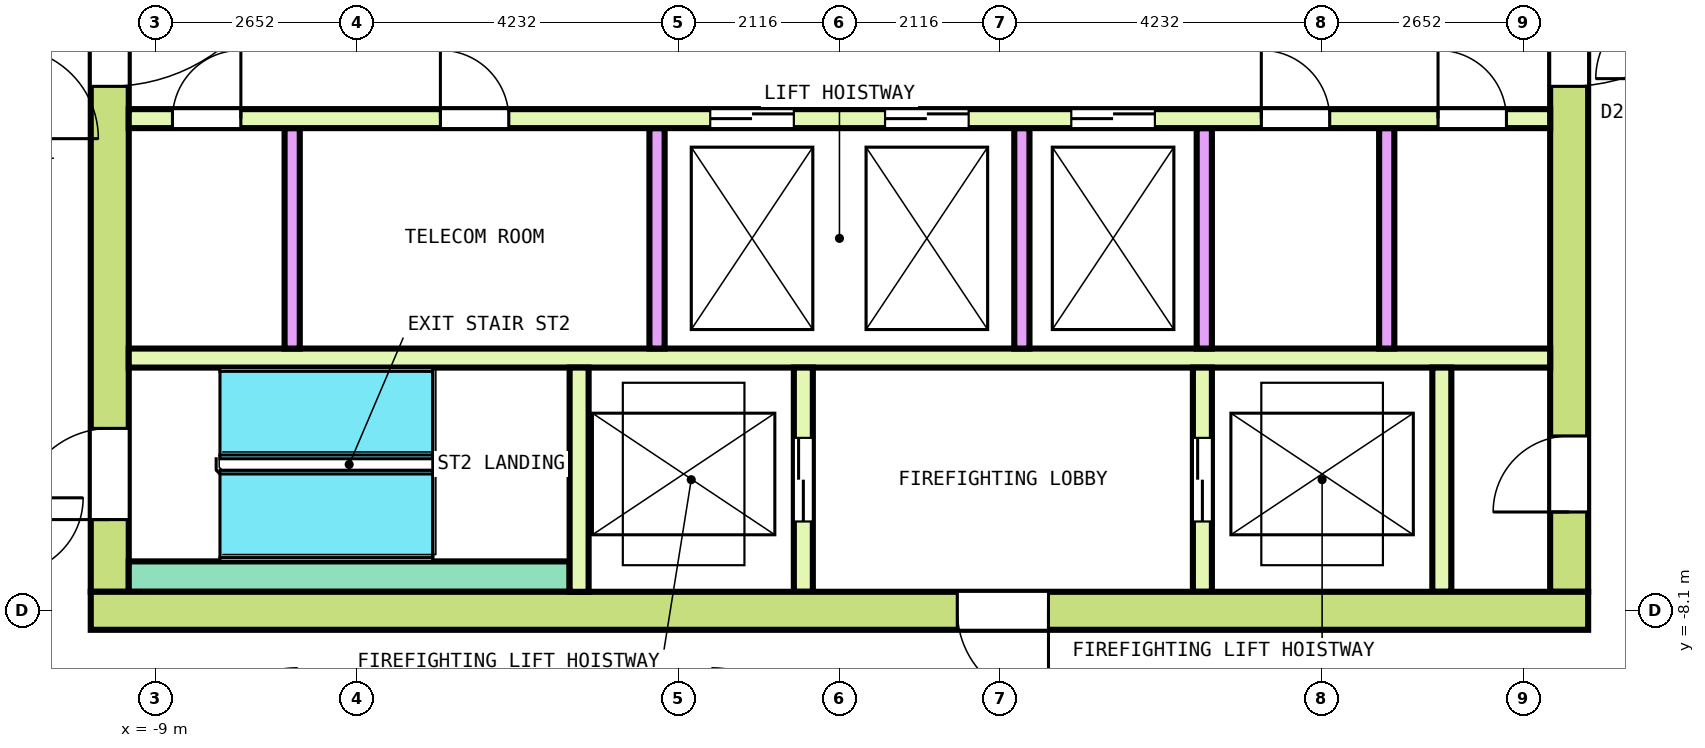
"""IFC4 building model, lengths in metres.
Left out: names, types, materials, properties, quantities, classifications, styles, units other than length and angle.
Written with IfcOpenShell. Run it as: python <this file> out.ifc"""

import sys

from ifc_helpers import new_model, si_unit, direction, frame, frame_2d, origin, place, context, subcontext, project, spatial, rectangle, extrude, element, fill, save


model = new_model("IFC4")
c1 = context("Model", 3, precision=1e-05, world=origin(), true_north=direction((0.0, 1.0)))
c2 = subcontext(c1, "Body", "Model", "MODEL_VIEW")
j1 = project(units=[si_unit("LENGTHUNIT", "METRE"), si_unit("PLANEANGLEUNIT", "RADIAN")], contexts=[c1])
p1 = place(None, origin())
s1 = spatial("IfcSite", under=j1, at=p1, CompositionType="ELEMENT")
p2 = place(p1, origin())
s2 = spatial("IfcBuilding", under=s1, at=p2, CompositionType="ELEMENT")
p3 = place(p2, frame((0.0, 0.0, 283.0)))
s3 = spatial("IfcBuildingStorey", under=s2, at=p3, CompositionType="ELEMENT", Elevation=283.0)
p4 = place(p3, frame((-9.85, -8.1, 0.0), z_axis=(0.0, 0.0, 1.0), x_axis=(1.0, 0.0, 0.0)))
e1 = element("IfcWall", 1, at=p4, inside=s3, PredefinedType="SHEAR", context=c2, shape_type="SweptSolid", body=[
    extrude(rectangle(XDim=19.7, YDim=0.5, at=frame_2d((9.85, 0.0))), origin(), (0.0, 0.0, 1.0), 3.7),
])
p5 = place(p4, frame((11.4, 0.0, 0.0)))
e2 = element("IfcOpeningElement", 2, at=p5, cuts=e1, PredefinedType="OPENING", context=c2, shape_type="SweptSolid", body=[
    extrude(rectangle(XDim=1.2, YDim=2.1, at=frame_2d((0.6, 1.05))), frame((0.0, 0.26, 0.0), z_axis=(0.0, -1.0, 0.0), x_axis=(1.0, 0.0, 0.0)), (0.0, 0.0, 1.0), 0.52),
])
p6 = place(p3, frame((-9.6, -7.85, 0.0), z_axis=(0.0, 0.0, 1.0), x_axis=(0.0, 1.0, 0.0)))
e3 = element("IfcWall", 3, at=p6, inside=s3, PredefinedType="SHEAR", context=c2, shape_type="SweptSolid", body=[
    extrude(rectangle(XDim=15.7, YDim=0.5, at=frame_2d((7.85, 0.0))), origin(), (0.0, 0.0, 1.0), 3.7),
])
p7 = place(p6, frame((6.65, 0.0, 0.0)))
e4 = element("IfcOpeningElement", 4, at=p7, cuts=e3, PredefinedType="OPENING", context=c2, shape_type="SweptSolid", body=[
    extrude(rectangle(XDim=2.4, YDim=2.1, at=frame_2d((1.2, 1.05))), frame((0.0, 0.26, 0.0), z_axis=(0.0, -1.0, 0.0), x_axis=(1.0, 0.0, 0.0)), (0.0, 0.0, 1.0), 0.52),
])
p8 = place(p6, frame((13.55, 0.0, 0.0)))
e5 = element("IfcOpeningElement", 5, at=p8, cuts=e3, PredefinedType="OPENING", context=c2, shape_type="SweptSolid", body=[
    extrude(rectangle(XDim=1.2, YDim=2.1, at=frame_2d((0.6, 1.05))), frame((0.0, 0.26, 0.0), z_axis=(0.0, -1.0, 0.0), x_axis=(1.0, 0.0, 0.0)), (0.0, 0.0, 1.0), 0.52),
])
p9 = place(p6, frame((0.95, 0.0, 0.0)))
e6 = element("IfcOpeningElement", 6, at=p9, cuts=e3, PredefinedType="OPENING", context=c2, shape_type="SweptSolid", body=[
    extrude(rectangle(XDim=1.2, YDim=2.1, at=frame_2d((0.6, 1.05))), frame((0.0, 0.26, 0.0), z_axis=(0.0, -1.0, 0.0), x_axis=(1.0, 0.0, 0.0)), (0.0, 0.0, 1.0), 0.52),
])
p10 = place(p3, frame((9.6, -7.85, 0.0), z_axis=(0.0, 0.0, 1.0), x_axis=(0.0, 1.0, 0.0)))
e7 = element("IfcWall", 7, at=p10, inside=s3, PredefinedType="SHEAR", context=c2, shape_type="SweptSolid", body=[
    extrude(rectangle(XDim=15.7, YDim=0.5, at=frame_2d((7.85, 0.0))), origin(), (0.0, 0.0, 1.0), 3.7),
])
p11 = place(p10, frame((6.65, 0.0, 0.0)))
e8 = element("IfcOpeningElement", 8, at=p11, cuts=e7, PredefinedType="OPENING", context=c2, shape_type="SweptSolid", body=[
    extrude(rectangle(XDim=2.4, YDim=2.1, at=frame_2d((1.2, 1.05))), frame((0.0, 0.26, 0.0), z_axis=(0.0, -1.0, 0.0), x_axis=(1.0, 0.0, 0.0)), (0.0, 0.0, 1.0), 0.52),
])
p12 = place(p10, frame((13.55, 0.0, 0.0)))
e9 = element("IfcOpeningElement", 9, at=p12, cuts=e7, PredefinedType="OPENING", context=c2, shape_type="SweptSolid", body=[
    extrude(rectangle(XDim=1.2, YDim=2.1, at=frame_2d((0.6, 1.05))), frame((0.0, 0.26, 0.0), z_axis=(0.0, -1.0, 0.0), x_axis=(1.0, 0.0, 0.0)), (0.0, 0.0, 1.0), 0.52),
])
p13 = place(p10, frame((1.05, 0.0, 0.0)))
e10 = element("IfcOpeningElement", 10, at=p13, cuts=e7, PredefinedType="OPENING", context=c2, shape_type="SweptSolid", body=[
    extrude(rectangle(XDim=1.0, YDim=2.1, at=frame_2d((0.5, 1.05))), frame((0.0, 0.26, 0.0), z_axis=(0.0, -1.0, 0.0), x_axis=(1.0, 0.0, 0.0)), (0.0, 0.0, 1.0), 0.52),
])
p14 = place(p3, frame((-9.35, -1.625, 0.0), z_axis=(0.0, 0.0, 1.0), x_axis=(1.0, 0.0, 0.0)))
e11 = element("IfcWall", 11, at=p14, inside=s3, PredefinedType="SOLIDWALL", context=c2, shape_type="SweptSolid", body=[
    extrude(rectangle(XDim=18.7, YDim=0.25, at=frame_2d((9.35, 0.0))), origin(), (0.0, 0.0, 1.0), 3.7),
])
p15 = place(p14, frame((7.65, 0.0, 0.0)))
e12 = element("IfcOpeningElement", 12, at=p15, cuts=e11, PredefinedType="OPENING", context=c2, shape_type="SweptSolid", body=[
    extrude(rectangle(XDim=1.1, YDim=2.1, at=frame_2d((0.55, 1.05))), frame((0.0, 0.135, 0.0), z_axis=(0.0, -1.0, 0.0), x_axis=(1.0, 0.0, 0.0)), (0.0, 0.0, 1.0), 0.27),
])
p16 = place(p14, frame((9.95, 0.0, 0.0)))
e13 = element("IfcOpeningElement", 13, at=p16, cuts=e11, PredefinedType="OPENING", context=c2, shape_type="SweptSolid", body=[
    extrude(rectangle(XDim=1.1, YDim=2.1, at=frame_2d((0.55, 1.05))), frame((0.0, 0.135, 0.0), z_axis=(0.0, -1.0, 0.0), x_axis=(1.0, 0.0, 0.0)), (0.0, 0.0, 1.0), 0.27),
])
p17 = place(p14, frame((12.4, 0.0, 0.0)))
e14 = element("IfcOpeningElement", 14, at=p17, cuts=e11, PredefinedType="OPENING", context=c2, shape_type="SweptSolid", body=[
    extrude(rectangle(XDim=1.1, YDim=2.1, at=frame_2d((0.55, 1.05))), frame((0.0, 0.135, 0.0), z_axis=(0.0, -1.0, 0.0), x_axis=(1.0, 0.0, 0.0)), (0.0, 0.0, 1.0), 0.27),
])
p18 = place(p14, frame((0.575, 0.0, 0.0)))
e15 = element("IfcOpeningElement", 15, at=p18, cuts=e11, PredefinedType="OPENING", context=c2, shape_type="SweptSolid", body=[
    extrude(rectangle(XDim=0.9, YDim=2.1, at=frame_2d((0.45, 1.05))), frame((0.0, 0.135, 0.0), z_axis=(0.0, -1.0, 0.0), x_axis=(1.0, 0.0, 0.0)), (0.0, 0.0, 1.0), 0.27),
])
p19 = place(p14, frame((4.1, 0.0, 0.0)))
e16 = element("IfcOpeningElement", 16, at=p19, cuts=e11, PredefinedType="OPENING", context=c2, shape_type="SweptSolid", body=[
    extrude(rectangle(XDim=0.9, YDim=2.1, at=frame_2d((0.45, 1.05))), frame((0.0, 0.135, 0.0), z_axis=(0.0, -1.0, 0.0), x_axis=(1.0, 0.0, 0.0)), (0.0, 0.0, 1.0), 0.27),
])
p20 = place(p14, frame((14.9, 0.0, 0.0)))
e17 = element("IfcOpeningElement", 17, at=p20, cuts=e11, PredefinedType="OPENING", context=c2, shape_type="SweptSolid", body=[
    extrude(rectangle(XDim=0.9, YDim=2.1, at=frame_2d((0.45, 1.05))), frame((0.0, 0.135, 0.0), z_axis=(0.0, -1.0, 0.0), x_axis=(1.0, 0.0, 0.0)), (0.0, 0.0, 1.0), 0.27),
])
p21 = place(p14, frame((17.225, 0.0, 0.0)))
e18 = element("IfcOpeningElement", 18, at=p21, cuts=e11, PredefinedType="OPENING", context=c2, shape_type="SweptSolid", body=[
    extrude(rectangle(XDim=0.9, YDim=2.1, at=frame_2d((0.45, 1.05))), frame((0.0, 0.135, 0.0), z_axis=(0.0, -1.0, 0.0), x_axis=(1.0, 0.0, 0.0)), (0.0, 0.0, 1.0), 0.27),
])
p22 = place(p3, frame((-9.35, -4.775, 0.0), z_axis=(0.0, 0.0, 1.0), x_axis=(1.0, 0.0, 0.0)))
e19 = element("IfcWall", 19, at=p22, inside=s3, PredefinedType="SOLIDWALL", context=c2, shape_type="SweptSolid", body=[
    extrude(rectangle(XDim=18.7, YDim=0.25, at=frame_2d((9.35, 0.0))), origin(), (0.0, 0.0, 1.0), 3.7),
])
for number, where, z_axis, x_axis in (
    (20, (-7.2, -4.65, 0.0), (0.0, 0.0, 1.0), (0.0, 1.0, 0.0)),
    (21, (-2.4, -4.65, 0.0), (0.0, 0.0, 1.0), (0.0, 1.0, 0.0)),
    (22, (2.4, -4.65, 0.0), (0.0, 0.0, 1.0), (0.0, 1.0, 0.0)),
    (23, (4.8, -4.65, 0.0), (0.0, 0.0, 1.0), (0.0, 1.0, 0.0)),
    (24, (7.2, -4.65, 0.0), (0.0, 0.0, 1.0), (0.0, 1.0, 0.0)),
):
    element("IfcWall", number, at=place(p3, frame(where, z_axis=z_axis, x_axis=x_axis)), inside=s3, PredefinedType="SOLIDWALL", context=c2, shape_type="SweptSolid", body=[
        extrude(rectangle(XDim=2.9, YDim=0.2, at=frame_2d((1.45, 0.0))), origin(), (0.0, 0.0, 1.0), 3.7),
    ])
p23 = place(p3, frame((-9.35, -7.65, 0.0), z_axis=(0.0, 0.0, 1.0), x_axis=(1.0, 0.0, 0.0)))
e25 = element("IfcWall", 25, at=p23, inside=s3, PredefinedType="SOLIDWALL", context=c2, shape_type="SweptSolid", body=[
    extrude(rectangle(XDim=5.8, YDim=0.4, at=frame_2d((2.9, 0.0))), origin(), (0.0, 0.0, 1.0), 3.7),
])
p24 = place(p3, frame((-3.425, -7.85, 0.0), z_axis=(0.0, 0.0, 1.0), x_axis=(0.0, 1.0, 0.0)))
e26 = element("IfcWall", 26, at=p24, inside=s3, PredefinedType="SOLIDWALL", context=c2, shape_type="SweptSolid", body=[
    extrude(rectangle(XDim=2.95, YDim=0.25, at=frame_2d((1.475, 0.0))), origin(), (0.0, 0.0, 1.0), 3.7),
])
p25 = place(p3, frame((-0.475, -7.85, 0.0), z_axis=(0.0, 0.0, 1.0), x_axis=(0.0, 1.0, 0.0)))
e27 = element("IfcWall", 27, at=p25, inside=s3, PredefinedType="SOLIDWALL", context=c2, shape_type="SweptSolid", body=[
    extrude(rectangle(XDim=2.95, YDim=0.25, at=frame_2d((1.475, 0.0))), origin(), (0.0, 0.0, 1.0), 3.7),
])
p26 = place(p25, frame((0.925, 0.0, 0.0)))
e28 = element("IfcOpeningElement", 28, at=p26, cuts=e27, PredefinedType="OPENING", context=c2, shape_type="SweptSolid", body=[
    extrude(rectangle(XDim=1.1, YDim=2.1, at=frame_2d((0.55, 1.05))), frame((0.0, 0.135, 0.0), z_axis=(0.0, -1.0, 0.0), x_axis=(1.0, 0.0, 0.0)), (0.0, 0.0, 1.0), 0.27),
])
p27 = place(p3, frame((4.775, -7.85, 0.0), z_axis=(0.0, 0.0, 1.0), x_axis=(0.0, 1.0, 0.0)))
e29 = element("IfcWall", 29, at=p27, inside=s3, PredefinedType="SOLIDWALL", context=c2, shape_type="SweptSolid", body=[
    extrude(rectangle(XDim=2.95, YDim=0.25, at=frame_2d((1.475, 0.0))), origin(), (0.0, 0.0, 1.0), 3.7),
])
p28 = place(p27, frame((0.925, 0.0, 0.0)))
e30 = element("IfcOpeningElement", 30, at=p28, cuts=e29, PredefinedType="OPENING", context=c2, shape_type="SweptSolid", body=[
    extrude(rectangle(XDim=1.1, YDim=2.1, at=frame_2d((0.55, 1.05))), frame((0.0, 0.135, 0.0), z_axis=(0.0, -1.0, 0.0), x_axis=(1.0, 0.0, 0.0)), (0.0, 0.0, 1.0), 0.27),
])
p29 = place(p3, frame((7.925, -7.85, 0.0), z_axis=(0.0, 0.0, 1.0), x_axis=(0.0, 1.0, 0.0)))
e31 = element("IfcWall", 31, at=p29, inside=s3, PredefinedType="SOLIDWALL", context=c2, shape_type="SweptSolid", body=[
    extrude(rectangle(XDim=2.95, YDim=0.25, at=frame_2d((1.475, 0.0))), origin(), (0.0, 0.0, 1.0), 3.7),
])
p30 = place(p15, origin())
e32 = element("IfcDoor", 32, at=p30, inside=s3, OperationType="DOUBLE_DOOR_SLIDING", PredefinedType="DOOR", context=c2, shape_type="SweptSolid", body=[
    extrude(rectangle(XDim=1.1, YDim=2.1, at=frame_2d((0.55, 1.05))), frame((0.0, 0.075, 0.0), z_axis=(0.0, -1.0, 0.0), x_axis=(1.0, 0.0, 0.0)), (0.0, 0.0, 1.0), 0.15),
])
fill(e12, e32)
p31 = place(p16, origin())
e33 = element("IfcDoor", 33, at=p31, inside=s3, OperationType="DOUBLE_DOOR_SLIDING", PredefinedType="DOOR", context=c2, shape_type="SweptSolid", body=[
    extrude(rectangle(XDim=1.1, YDim=2.1, at=frame_2d((0.55, 1.05))), frame((0.0, 0.075, 0.0), z_axis=(0.0, -1.0, 0.0), x_axis=(1.0, 0.0, 0.0)), (0.0, 0.0, 1.0), 0.15),
])
fill(e13, e33)
p32 = place(p17, origin())
e34 = element("IfcDoor", 34, at=p32, inside=s3, OperationType="DOUBLE_DOOR_SLIDING", PredefinedType="DOOR", context=c2, shape_type="SweptSolid", body=[
    extrude(rectangle(XDim=1.1, YDim=2.1, at=frame_2d((0.55, 1.05))), frame((0.0, 0.075, 0.0), z_axis=(0.0, -1.0, 0.0), x_axis=(1.0, 0.0, 0.0)), (0.0, 0.0, 1.0), 0.15),
])
fill(e14, e34)
p33 = place(p26, origin())
e35 = element("IfcDoor", 35, at=p33, inside=s3, OperationType="DOUBLE_DOOR_SLIDING", PredefinedType="DOOR", context=c2, shape_type="SweptSolid", body=[
    extrude(rectangle(XDim=1.1, YDim=2.1, at=frame_2d((0.55, 1.05))), frame((0.0, 0.075, 0.0), z_axis=(0.0, -1.0, 0.0), x_axis=(1.0, 0.0, 0.0)), (0.0, 0.0, 1.0), 0.15),
])
fill(e28, e35)
p34 = place(p28, origin())
e36 = element("IfcDoor", 36, at=p34, inside=s3, OperationType="DOUBLE_DOOR_SLIDING", PredefinedType="DOOR", context=c2, shape_type="SweptSolid", body=[
    extrude(rectangle(XDim=1.1, YDim=2.1, at=frame_2d((0.55, 1.05))), frame((0.0, 0.075, 0.0), z_axis=(0.0, -1.0, 0.0), x_axis=(1.0, 0.0, 0.0)), (0.0, 0.0, 1.0), 0.15),
])
fill(e30, e36)
p35 = place(p7, origin())
e37 = element("IfcDoor", 37, at=p35, inside=s3, OperationType="DOUBLE_DOOR_SINGLE_SWING", PredefinedType="DOOR", context=c2, shape_type="SweptSolid", body=[
    extrude(rectangle(XDim=2.4, YDim=2.1, at=frame_2d((1.2, 1.05))), frame((0.0, 0.2, 0.0), z_axis=(0.0, -1.0, 0.0), x_axis=(1.0, 0.0, 0.0)), (0.0, 0.0, 1.0), 0.4),
])
fill(e4, e37)
p36 = place(p11, origin())
e38 = element("IfcDoor", 38, at=p36, inside=s3, OperationType="DOUBLE_DOOR_SINGLE_SWING", PredefinedType="DOOR", context=c2, shape_type="SweptSolid", body=[
    extrude(rectangle(XDim=2.4, YDim=2.1, at=frame_2d((1.2, 1.05))), frame((0.0, 0.2, 0.0), z_axis=(0.0, -1.0, 0.0), x_axis=(1.0, 0.0, 0.0)), (0.0, 0.0, 1.0), 0.4),
])
fill(e8, e38)
p37 = place(p9, origin())
e39 = element("IfcDoor", 39, at=p37, inside=s3, OperationType="SINGLE_SWING_LEFT", PredefinedType="DOOR", context=c2, shape_type="SweptSolid", body=[
    extrude(rectangle(XDim=1.2, YDim=2.1, at=frame_2d((0.6, 1.05))), frame((0.0, 0.2, 0.0), z_axis=(0.0, -1.0, 0.0), x_axis=(1.0, 0.0, 0.0)), (0.0, 0.0, 1.0), 0.4),
])
fill(e6, e39)
p38 = place(p5, origin())
e40 = element("IfcDoor", 40, at=p38, inside=s3, OperationType="SINGLE_SWING_LEFT", PredefinedType="DOOR", context=c2, shape_type="SweptSolid", body=[
    extrude(rectangle(XDim=1.2, YDim=2.1, at=frame_2d((0.6, 1.05))), frame((0.0, 0.2, 0.0), z_axis=(0.0, -1.0, 0.0), x_axis=(1.0, 0.0, 0.0)), (0.0, 0.0, 1.0), 0.4),
])
fill(e2, e40)
p39 = place(p13, origin())
e41 = element("IfcDoor", 41, at=p39, inside=s3, OperationType="SINGLE_SWING_LEFT", PredefinedType="DOOR", context=c2, shape_type="SweptSolid", body=[
    extrude(rectangle(XDim=1.0, YDim=2.1, at=frame_2d((0.5, 1.05))), frame((0.0, 0.2, 0.0), z_axis=(0.0, -1.0, 0.0), x_axis=(1.0, 0.0, 0.0)), (0.0, 0.0, 1.0), 0.4),
])
fill(e10, e41)
p40 = place(p18, origin())
e42 = element("IfcDoor", 42, at=p40, inside=s3, OperationType="SINGLE_SWING_RIGHT", PredefinedType="DOOR", context=c2, shape_type="SweptSolid", body=[
    extrude(rectangle(XDim=0.9, YDim=2.1, at=frame_2d((0.45, 1.05))), frame((0.0, 0.075, 0.0), z_axis=(0.0, -1.0, 0.0), x_axis=(1.0, 0.0, 0.0)), (0.0, 0.0, 1.0), 0.15),
])
fill(e15, e42)
p41 = place(p19, origin())
e43 = element("IfcDoor", 43, at=p41, inside=s3, OperationType="SINGLE_SWING_LEFT", PredefinedType="DOOR", context=c2, shape_type="SweptSolid", body=[
    extrude(rectangle(XDim=0.9, YDim=2.1, at=frame_2d((0.45, 1.05))), frame((0.0, 0.075, 0.0), z_axis=(0.0, -1.0, 0.0), x_axis=(1.0, 0.0, 0.0)), (0.0, 0.0, 1.0), 0.15),
])
fill(e16, e43)
p42 = place(p20, origin())
e44 = element("IfcDoor", 44, at=p42, inside=s3, OperationType="SINGLE_SWING_RIGHT", PredefinedType="DOOR", context=c2, shape_type="SweptSolid", body=[
    extrude(rectangle(XDim=0.9, YDim=2.1, at=frame_2d((0.45, 1.05))), frame((0.0, 0.075, 0.0), z_axis=(0.0, -1.0, 0.0), x_axis=(1.0, 0.0, 0.0)), (0.0, 0.0, 1.0), 0.15),
])
fill(e17, e44)
p43 = place(p21, origin())
e45 = element("IfcDoor", 45, at=p43, inside=s3, OperationType="SINGLE_SWING_LEFT", PredefinedType="DOOR", context=c2, shape_type="SweptSolid", body=[
    extrude(rectangle(XDim=0.9, YDim=2.1, at=frame_2d((0.45, 1.05))), frame((0.0, 0.075, 0.0), z_axis=(0.0, -1.0, 0.0), x_axis=(1.0, 0.0, 0.0)), (0.0, 0.0, 1.0), 0.15),
])
fill(e18, e45)
save(model, sys.argv[1])
